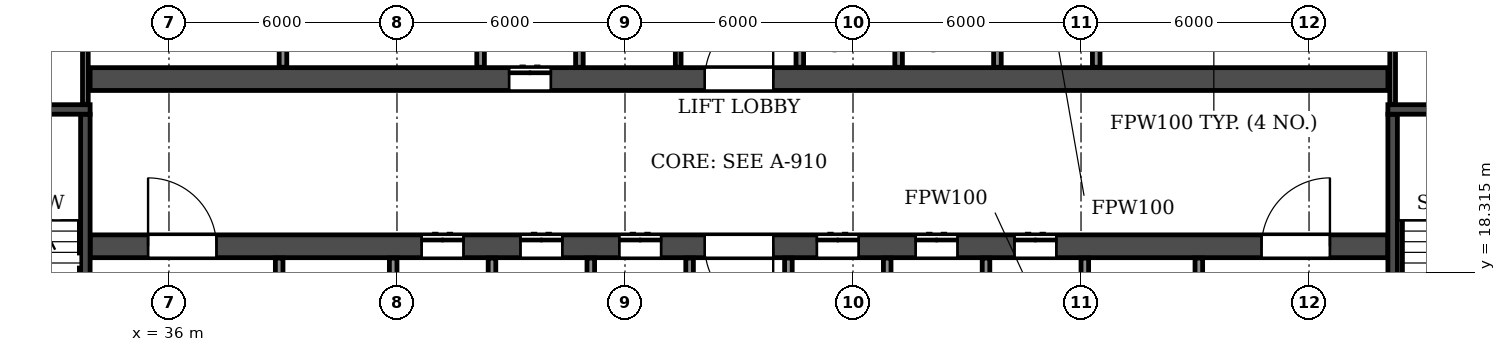
"""IFC4 building model, lengths in metres.
Left out: names, types, materials, properties, quantities, classifications, styles, units other than length and angle.
Written with IfcOpenShell. Run it as: python <this file> out.ifc"""

import sys

from ifc_helpers import new_model, si_unit, direction, frame, frame_2d, origin, place, context, subcontext, project, spatial, rectangle, extrude, element, fill, save


model = new_model("IFC4")
c1 = context("Model", 3, precision=1e-05, world=origin(), true_north=direction((0.0, 1.0)))
c2 = subcontext(c1, "Body", "Model", "MODEL_VIEW")
j1 = project(units=[si_unit("LENGTHUNIT", "METRE"), si_unit("PLANEANGLEUNIT", "RADIAN")], contexts=[c1])
p1 = place(None, origin())
s1 = spatial("IfcSite", under=j1, at=p1, CompositionType="ELEMENT")
p2 = place(p1, origin())
s2 = spatial("IfcBuilding", under=s1, at=p2, CompositionType="ELEMENT")
p3 = place(p2, frame((0.0, 0.0, 49.8)))
s3 = spatial("IfcBuildingStorey", under=s2, at=p3, CompositionType="ELEMENT", Elevation=49.8)
p4 = place(p3, frame((33.925, 19.0, 0.0), z_axis=(0.0, 0.0, 1.0), x_axis=(1.0, 0.0, 0.0)))
e1 = element("IfcWall", 1, at=p4, inside=s3, PredefinedType="SOLIDWALL", context=c2, shape_type="SweptSolid", body=[
    extrude(rectangle(XDim=34.15, YDim=0.6, at=frame_2d((17.075, 0.0))), origin(), (0.0, 0.0, 1.0), 3.0),
])
p5 = place(p4, frame((16.175, 0.0, 0.0)))
e2 = element("IfcOpeningElement", 2, at=p5, cuts=e1, PredefinedType="OPENING", context=c2, shape_type="SweptSolid", body=[
    extrude(rectangle(XDim=1.8, YDim=2.1, at=frame_2d((0.9, 1.05))), frame((0.0, 0.31, 0.0), z_axis=(0.0, -1.0, 0.0), x_axis=(1.0, 0.0, 0.0)), (0.0, 0.0, 1.0), 0.62),
])
p6 = place(p4, frame((1.525, 0.0, 0.0)))
e3 = element("IfcOpeningElement", 3, at=p6, cuts=e1, PredefinedType="OPENING", context=c2, shape_type="SweptSolid", body=[
    extrude(rectangle(XDim=1.8, YDim=2.1, at=frame_2d((0.9, 1.05))), frame((0.0, 0.31, 0.0), z_axis=(0.0, -1.0, 0.0), x_axis=(1.0, 0.0, 0.0)), (0.0, 0.0, 1.0), 0.62),
])
p7 = place(p4, frame((8.725, 0.0, 0.0)))
e4 = element("IfcOpeningElement", 4, at=p7, cuts=e1, PredefinedType="OPENING", context=c2, shape_type="SweptSolid", body=[
    extrude(rectangle(XDim=1.1, YDim=2.1, at=frame_2d((0.55, 1.05))), frame((0.0, 0.31, 0.0), z_axis=(0.0, -1.0, 0.0), x_axis=(1.0, 0.0, 0.0)), (0.0, 0.0, 1.0), 0.62),
])
p8 = place(p4, frame((11.325, 0.0, 0.0)))
e5 = element("IfcOpeningElement", 5, at=p8, cuts=e1, PredefinedType="OPENING", context=c2, shape_type="SweptSolid", body=[
    extrude(rectangle(XDim=1.1, YDim=2.1, at=frame_2d((0.55, 1.05))), frame((0.0, 0.31, 0.0), z_axis=(0.0, -1.0, 0.0), x_axis=(1.0, 0.0, 0.0)), (0.0, 0.0, 1.0), 0.62),
])
p9 = place(p4, frame((13.925, 0.0, 0.0)))
e6 = element("IfcOpeningElement", 6, at=p9, cuts=e1, PredefinedType="OPENING", context=c2, shape_type="SweptSolid", body=[
    extrude(rectangle(XDim=1.1, YDim=2.1, at=frame_2d((0.55, 1.05))), frame((0.0, 0.31, 0.0), z_axis=(0.0, -1.0, 0.0), x_axis=(1.0, 0.0, 0.0)), (0.0, 0.0, 1.0), 0.62),
])
p10 = place(p4, frame((19.125, 0.0, 0.0)))
e7 = element("IfcOpeningElement", 7, at=p10, cuts=e1, PredefinedType="OPENING", context=c2, shape_type="SweptSolid", body=[
    extrude(rectangle(XDim=1.1, YDim=2.1, at=frame_2d((0.55, 1.05))), frame((0.0, 0.31, 0.0), z_axis=(0.0, -1.0, 0.0), x_axis=(1.0, 0.0, 0.0)), (0.0, 0.0, 1.0), 0.62),
])
p11 = place(p4, frame((21.725, 0.0, 0.0)))
e8 = element("IfcOpeningElement", 8, at=p11, cuts=e1, PredefinedType="OPENING", context=c2, shape_type="SweptSolid", body=[
    extrude(rectangle(XDim=1.1, YDim=2.1, at=frame_2d((0.55, 1.05))), frame((0.0, 0.31, 0.0), z_axis=(0.0, -1.0, 0.0), x_axis=(1.0, 0.0, 0.0)), (0.0, 0.0, 1.0), 0.62),
])
p12 = place(p4, frame((24.325, 0.0, 0.0)))
e9 = element("IfcOpeningElement", 9, at=p12, cuts=e1, PredefinedType="OPENING", context=c2, shape_type="SweptSolid", body=[
    extrude(rectangle(XDim=1.1, YDim=2.1, at=frame_2d((0.55, 1.05))), frame((0.0, 0.31, 0.0), z_axis=(0.0, -1.0, 0.0), x_axis=(1.0, 0.0, 0.0)), (0.0, 0.0, 1.0), 0.62),
])
p13 = place(p4, frame((30.825, 0.0, 0.0)))
e10 = element("IfcOpeningElement", 10, at=p13, cuts=e1, PredefinedType="OPENING", context=c2, shape_type="SweptSolid", body=[
    extrude(rectangle(XDim=1.8, YDim=2.1, at=frame_2d((0.9, 1.05))), frame((0.0, 0.31, 0.0), z_axis=(0.0, -1.0, 0.0), x_axis=(1.0, 0.0, 0.0)), (0.0, 0.0, 1.0), 0.62),
])
p14 = place(p3, frame((33.925, 23.4, 0.0), z_axis=(0.0, 0.0, 1.0), x_axis=(1.0, 0.0, 0.0)))
e11 = element("IfcWall", 11, at=p14, inside=s3, PredefinedType="SOLIDWALL", context=c2, shape_type="SweptSolid", body=[
    extrude(rectangle(XDim=34.15, YDim=0.6, at=frame_2d((17.075, 0.0))), origin(), (0.0, 0.0, 1.0), 3.0),
])
p15 = place(p14, frame((16.175, 0.0, 0.0)))
e12 = element("IfcOpeningElement", 12, at=p15, cuts=e11, PredefinedType="OPENING", context=c2, shape_type="SweptSolid", body=[
    extrude(rectangle(XDim=1.8, YDim=2.1, at=frame_2d((0.9, 1.05))), frame((0.0, 0.31, 0.0), z_axis=(0.0, -1.0, 0.0), x_axis=(1.0, 0.0, 0.0)), (0.0, 0.0, 1.0), 0.62),
])
p16 = place(p14, frame((11.025, 0.0, 0.0)))
e13 = element("IfcOpeningElement", 13, at=p16, cuts=e11, PredefinedType="OPENING", context=c2, shape_type="SweptSolid", body=[
    extrude(rectangle(XDim=1.1, YDim=2.1, at=frame_2d((0.55, 1.05))), frame((0.0, 0.31, 0.0), z_axis=(0.0, -1.0, 0.0), x_axis=(1.0, 0.0, 0.0)), (0.0, 0.0, 1.0), 0.62),
])
p17 = place(p3, frame((33.8, 14.9, 0.0), z_axis=(0.0, 0.0, 1.0), x_axis=(0.0, 1.0, 0.0)))
e14 = element("IfcWall", 14, at=p17, inside=s3, PredefinedType="SOLIDWALL", context=c2, shape_type="SweptSolid", body=[
    extrude(rectangle(XDim=7.575, YDim=0.25, at=frame_2d((3.788, 0.0))), origin(), (0.0, 0.0, 1.0), 3.0),
])
p18 = place(p17, frame((0.4, 0.0, 0.0)))
e15 = element("IfcOpeningElement", 15, at=p18, cuts=e14, PredefinedType="OPENING", context=c2, shape_type="SweptSolid", body=[
    extrude(rectangle(XDim=1.0, YDim=2.1, at=frame_2d((0.5, 1.05))), frame((0.0, 0.135, 0.0), z_axis=(0.0, -1.0, 0.0), x_axis=(1.0, 0.0, 0.0)), (0.0, 0.0, 1.0), 0.27),
])
p19 = place(p3, frame((29.875, 22.6, 0.0), z_axis=(0.0, 0.0, 1.0), x_axis=(1.0, 0.0, 0.0)))
e16 = element("IfcWall", 16, at=p19, inside=s3, PredefinedType="SOLIDWALL", context=c2, shape_type="SweptSolid", body=[
    extrude(rectangle(XDim=4.05, YDim=0.25, at=frame_2d((2.025, 0.0))), origin(), (0.0, 0.0, 1.0), 3.0),
])
p20 = place(p3, frame((68.2, 14.9, 0.0), z_axis=(0.0, 0.0, 1.0), x_axis=(0.0, 1.0, 0.0)))
e17 = element("IfcWall", 17, at=p20, inside=s3, PredefinedType="SOLIDWALL", context=c2, shape_type="SweptSolid", body=[
    extrude(rectangle(XDim=7.575, YDim=0.25, at=frame_2d((3.788, 0.0))), origin(), (0.0, 0.0, 1.0), 3.0),
])
p21 = place(p20, frame((0.4, 0.0, 0.0)))
e18 = element("IfcOpeningElement", 18, at=p21, cuts=e17, PredefinedType="OPENING", context=c2, shape_type="SweptSolid", body=[
    extrude(rectangle(XDim=1.0, YDim=2.1, at=frame_2d((0.5, 1.05))), frame((0.0, 0.135, 0.0), z_axis=(0.0, -1.0, 0.0), x_axis=(1.0, 0.0, 0.0)), (0.0, 0.0, 1.0), 0.27),
])
p22 = place(p3, frame((68.075, 22.6, 0.0), z_axis=(0.0, 0.0, 1.0), x_axis=(1.0, 0.0, 0.0)))
e19 = element("IfcWall", 19, at=p22, inside=s3, PredefinedType="SOLIDWALL", context=c2, shape_type="SweptSolid", body=[
    extrude(rectangle(XDim=4.05, YDim=0.25, at=frame_2d((2.025, 0.0))), origin(), (0.0, 0.0, 1.0), 3.0),
])
p23 = place(p3, frame((49.4, 23.71, 0.0), z_axis=(0.0, 0.0, 1.0), x_axis=(0.0, 1.0, 0.0)))
e20 = element("IfcWall", 20, at=p23, inside=s3, PredefinedType="PARTITIONING", context=c2, shape_type="SweptSolid", body=[
    extrude(rectangle(XDim=3.78, YDim=0.15, at=frame_2d((1.89, 0.0))), origin(), (0.0, 0.0, 1.0), 3.0),
])
p24 = place(p3, frame((39.0, 23.71, 0.0), z_axis=(0.0, 0.0, 1.0), x_axis=(0.0, 1.0, 0.0)))
e21 = element("IfcWall", 21, at=p24, inside=s3, PredefinedType="PARTITIONING", context=c2, shape_type="SweptSolid", body=[
    extrude(rectangle(XDim=3.78, YDim=0.2, at=frame_2d((1.89, 0.0))), origin(), (0.0, 0.0, 1.0), 3.0),
])
for number, where, z_axis, x_axis in (
    (22, (33.8, 22.735, 0.0), (0.0, 0.0, 1.0), (0.0, 1.0, 0.0)),
    (23, (68.2, 22.735, 0.0), (0.0, 0.0, 1.0), (0.0, 1.0, 0.0)),
):
    element("IfcWall", number, at=place(p3, frame(where, z_axis=z_axis, x_axis=x_axis)), inside=s3, PredefinedType="PARTITIONING", context=c2, shape_type="SweptSolid", body=[
        extrude(rectangle(XDim=4.755, YDim=0.15, at=frame_2d((2.377, 0.0))), origin(), (0.0, 0.0, 1.0), 3.0),
    ])
p25 = place(p3, frame((38.9, 14.91, 0.0), z_axis=(0.0, 0.0, 1.0), x_axis=(0.0, 1.0, 0.0)))
e24 = element("IfcWall", 24, at=p25, inside=s3, PredefinedType="PARTITIONING", context=c2, shape_type="SweptSolid", body=[
    extrude(rectangle(XDim=3.78, YDim=0.2, at=frame_2d((1.89, 0.0))), origin(), (0.0, 0.0, 1.0), 3.0),
])
p26 = place(p25, frame((1.34, 0.0, 0.0)))
e25 = element("IfcOpeningElement", 25, at=p26, cuts=e24, PredefinedType="OPENING", context=c2, shape_type="SweptSolid", body=[
    extrude(rectangle(XDim=1.1, YDim=2.1, at=frame_2d((0.55, 1.05))), frame((0.0, 0.11, 0.0), z_axis=(0.0, -1.0, 0.0), x_axis=(1.0, 0.0, 0.0)), (0.0, 0.0, 1.0), 0.22),
])
for number, where, z_axis, x_axis in (
    (26, (41.9, 14.91, 0.0), (0.0, 0.0, 1.0), (0.0, 1.0, 0.0)),
    (27, (44.2, 23.71, 0.0), (0.0, 0.0, 1.0), (0.0, 1.0, 0.0)),
):
    element("IfcWall", number, at=place(p3, frame(where, z_axis=z_axis, x_axis=x_axis)), inside=s3, PredefinedType="PARTITIONING", context=c2, shape_type="SweptSolid", body=[
        extrude(rectangle(XDim=3.78, YDim=0.2, at=frame_2d((1.89, 0.0))), origin(), (0.0, 0.0, 1.0), 3.0),
    ])
p27 = place(p3, frame((44.5, 16.3, 0.0), z_axis=(0.0, 0.0, 1.0), x_axis=(0.0, 1.0, 0.0)))
e28 = element("IfcWall", 28, at=p27, inside=s3, PredefinedType="PARTITIONING", context=c2, shape_type="SweptSolid", body=[
    extrude(rectangle(XDim=2.39, YDim=0.2, at=frame_2d((1.195, 0.0))), origin(), (0.0, 0.0, 1.0), 3.0),
])
p28 = place(p3, frame((46.8, 23.71, 0.0), z_axis=(0.0, 0.0, 1.0), x_axis=(0.0, 1.0, 0.0)))
e29 = element("IfcWall", 29, at=p28, inside=s3, PredefinedType="PARTITIONING", context=c2, shape_type="SweptSolid", body=[
    extrude(rectangle(XDim=3.78, YDim=0.2, at=frame_2d((1.89, 0.0))), origin(), (0.0, 0.0, 1.0), 3.0),
])
for number, where, z_axis, x_axis in (
    (30, (47.1, 16.3, 0.0), (0.0, 0.0, 1.0), (0.0, 1.0, 0.0)),
    (31, (49.7, 16.3, 0.0), (0.0, 0.0, 1.0), (0.0, 1.0, 0.0)),
    (32, (52.3, 16.3, 0.0), (0.0, 0.0, 1.0), (0.0, 1.0, 0.0)),
):
    element("IfcWall", number, at=place(p3, frame(where, z_axis=z_axis, x_axis=x_axis)), inside=s3, PredefinedType="PARTITIONING", context=c2, shape_type="SweptSolid", body=[
        extrude(rectangle(XDim=2.39, YDim=0.2, at=frame_2d((1.195, 0.0))), origin(), (0.0, 0.0, 1.0), 3.0),
    ])
p29 = place(p3, frame((52.6, 23.71, 0.0), z_axis=(0.0, 0.0, 1.0), x_axis=(0.0, 1.0, 0.0)))
e33 = element("IfcWall", 33, at=p29, inside=s3, PredefinedType="PARTITIONING", context=c2, shape_type="SweptSolid", body=[
    extrude(rectangle(XDim=2.39, YDim=0.2, at=frame_2d((1.195, 0.0))), origin(), (0.0, 0.0, 1.0), 3.0),
])
p30 = place(p3, frame((54.9, 16.3, 0.0), z_axis=(0.0, 0.0, 1.0), x_axis=(0.0, 1.0, 0.0)))
e34 = element("IfcWall", 34, at=p30, inside=s3, PredefinedType="PARTITIONING", context=c2, shape_type="SweptSolid", body=[
    extrude(rectangle(XDim=2.39, YDim=0.2, at=frame_2d((1.195, 0.0))), origin(), (0.0, 0.0, 1.0), 3.0),
])
p31 = place(p3, frame((55.2, 23.71, 0.0), z_axis=(0.0, 0.0, 1.0), x_axis=(0.0, 1.0, 0.0)))
e35 = element("IfcWall", 35, at=p31, inside=s3, PredefinedType="PARTITIONING", context=c2, shape_type="SweptSolid", body=[
    extrude(rectangle(XDim=2.39, YDim=0.2, at=frame_2d((1.195, 0.0))), origin(), (0.0, 0.0, 1.0), 3.0),
])
p32 = place(p3, frame((57.5, 16.3, 0.0), z_axis=(0.0, 0.0, 1.0), x_axis=(0.0, 1.0, 0.0)))
e36 = element("IfcWall", 36, at=p32, inside=s3, PredefinedType="PARTITIONING", context=c2, shape_type="SweptSolid", body=[
    extrude(rectangle(XDim=2.39, YDim=0.2, at=frame_2d((1.195, 0.0))), origin(), (0.0, 0.0, 1.0), 3.0),
])
p33 = place(p3, frame((57.8, 23.71, 0.0), z_axis=(0.0, 0.0, 1.0), x_axis=(0.0, 1.0, 0.0)))
e37 = element("IfcWall", 37, at=p33, inside=s3, PredefinedType="PARTITIONING", context=c2, shape_type="SweptSolid", body=[
    extrude(rectangle(XDim=2.39, YDim=0.2, at=frame_2d((1.195, 0.0))), origin(), (0.0, 0.0, 1.0), 3.0),
])
p34 = place(p3, frame((60.1, 14.91, 0.0), z_axis=(0.0, 0.0, 1.0), x_axis=(0.0, 1.0, 0.0)))
e38 = element("IfcWall", 38, at=p34, inside=s3, PredefinedType="PARTITIONING", context=c2, shape_type="SweptSolid", body=[
    extrude(rectangle(XDim=3.78, YDim=0.2, at=frame_2d((1.89, 0.0))), origin(), (0.0, 0.0, 1.0), 3.0),
])
p35 = place(p3, frame((60.4, 23.71, 0.0), z_axis=(0.0, 0.0, 1.0), x_axis=(0.0, 1.0, 0.0)))
e39 = element("IfcWall", 39, at=p35, inside=s3, PredefinedType="PARTITIONING", context=c2, shape_type="SweptSolid", body=[
    extrude(rectangle(XDim=2.39, YDim=0.2, at=frame_2d((1.195, 0.0))), origin(), (0.0, 0.0, 1.0), 3.0),
])
p36 = place(p3, frame((63.1, 14.91, 0.0), z_axis=(0.0, 0.0, 1.0), x_axis=(0.0, 1.0, 0.0)))
e40 = element("IfcWall", 40, at=p36, inside=s3, PredefinedType="PARTITIONING", context=c2, shape_type="SweptSolid", body=[
    extrude(rectangle(XDim=3.78, YDim=0.2, at=frame_2d((1.89, 0.0))), origin(), (0.0, 0.0, 1.0), 3.0),
])
p37 = place(p36, frame((1.34, 0.0, 0.0)))
e41 = element("IfcOpeningElement", 41, at=p37, cuts=e40, PredefinedType="OPENING", context=c2, shape_type="SweptSolid", body=[
    extrude(rectangle(XDim=1.1, YDim=2.1, at=frame_2d((0.55, 1.05))), frame((0.0, 0.11, 0.0), z_axis=(0.0, -1.0, 0.0), x_axis=(1.0, 0.0, 0.0)), (0.0, 0.0, 1.0), 0.22),
])
p38 = place(p15, origin())
e42 = element("IfcDoor", 42, at=p38, inside=s3, OperationType="DOUBLE_DOOR_SINGLE_SWING", PredefinedType="DOOR", context=c2, shape_type="SweptSolid", body=[
    extrude(rectangle(XDim=1.8, YDim=2.1, at=frame_2d((0.9, 1.05))), frame((0.0, 0.025, 0.0), z_axis=(0.0, -1.0, 0.0), x_axis=(1.0, 0.0, 0.0)), (0.0, 0.0, 1.0), 0.05),
])
fill(e12, e42)
p39 = place(p5, frame((1.8, 0.0, 0.0), z_axis=(0.0, 0.0, 1.0), x_axis=(-1.0, 0.0, 0.0)))
e43 = element("IfcDoor", 43, at=p39, inside=s3, OperationType="DOUBLE_DOOR_SINGLE_SWING", PredefinedType="DOOR", context=c2, shape_type="SweptSolid", body=[
    extrude(rectangle(XDim=1.8, YDim=2.1, at=frame_2d((0.9, 1.05))), frame((0.0, 0.025, 0.0), z_axis=(0.0, -1.0, 0.0), x_axis=(1.0, 0.0, 0.0)), (0.0, 0.0, 1.0), 0.05),
])
fill(e2, e43)
p40 = place(p6, origin())
e44 = element("IfcDoor", 44, at=p40, inside=s3, OperationType="DOUBLE_DOOR_SINGLE_SWING", PredefinedType="DOOR", context=c2, shape_type="SweptSolid", body=[
    extrude(rectangle(XDim=1.8, YDim=2.1, at=frame_2d((0.9, 1.05))), frame((0.0, 0.025, 0.0), z_axis=(0.0, -1.0, 0.0), x_axis=(1.0, 0.0, 0.0)), (0.0, 0.0, 1.0), 0.05),
])
fill(e3, e44)
p41 = place(p7, origin())
e45 = element("IfcDoor", 45, at=p41, inside=s3, OperationType="DOUBLE_DOOR_SLIDING", PredefinedType="DOOR", context=c2, shape_type="SweptSolid", body=[
    extrude(rectangle(XDim=1.1, YDim=2.1, at=frame_2d((0.55, 1.05))), frame((0.0, 0.025, 0.0), z_axis=(0.0, -1.0, 0.0), x_axis=(1.0, 0.0, 0.0)), (0.0, 0.0, 1.0), 0.05),
])
fill(e4, e45)
p42 = place(p16, origin())
e46 = element("IfcDoor", 46, at=p42, inside=s3, OperationType="DOUBLE_DOOR_SLIDING", PredefinedType="DOOR", context=c2, shape_type="SweptSolid", body=[
    extrude(rectangle(XDim=1.1, YDim=2.1, at=frame_2d((0.55, 1.05))), frame((0.0, 0.025, 0.0), z_axis=(0.0, -1.0, 0.0), x_axis=(1.0, 0.0, 0.0)), (0.0, 0.0, 1.0), 0.05),
])
fill(e13, e46)
p43 = place(p8, origin())
e47 = element("IfcDoor", 47, at=p43, inside=s3, OperationType="DOUBLE_DOOR_SLIDING", PredefinedType="DOOR", context=c2, shape_type="SweptSolid", body=[
    extrude(rectangle(XDim=1.1, YDim=2.1, at=frame_2d((0.55, 1.05))), frame((0.0, 0.025, 0.0), z_axis=(0.0, -1.0, 0.0), x_axis=(1.0, 0.0, 0.0)), (0.0, 0.0, 1.0), 0.05),
])
fill(e5, e47)
p44 = place(p9, origin())
e48 = element("IfcDoor", 48, at=p44, inside=s3, OperationType="DOUBLE_DOOR_SLIDING", PredefinedType="DOOR", context=c2, shape_type="SweptSolid", body=[
    extrude(rectangle(XDim=1.1, YDim=2.1, at=frame_2d((0.55, 1.05))), frame((0.0, 0.025, 0.0), z_axis=(0.0, -1.0, 0.0), x_axis=(1.0, 0.0, 0.0)), (0.0, 0.0, 1.0), 0.05),
])
fill(e6, e48)
p45 = place(p10, origin())
e49 = element("IfcDoor", 49, at=p45, inside=s3, OperationType="DOUBLE_DOOR_SLIDING", PredefinedType="DOOR", context=c2, shape_type="SweptSolid", body=[
    extrude(rectangle(XDim=1.1, YDim=2.1, at=frame_2d((0.55, 1.05))), frame((0.0, 0.025, 0.0), z_axis=(0.0, -1.0, 0.0), x_axis=(1.0, 0.0, 0.0)), (0.0, 0.0, 1.0), 0.05),
])
fill(e7, e49)
p46 = place(p11, origin())
e50 = element("IfcDoor", 50, at=p46, inside=s3, OperationType="DOUBLE_DOOR_SLIDING", PredefinedType="DOOR", context=c2, shape_type="SweptSolid", body=[
    extrude(rectangle(XDim=1.1, YDim=2.1, at=frame_2d((0.55, 1.05))), frame((0.0, 0.025, 0.0), z_axis=(0.0, -1.0, 0.0), x_axis=(1.0, 0.0, 0.0)), (0.0, 0.0, 1.0), 0.05),
])
fill(e8, e50)
p47 = place(p12, origin())
e51 = element("IfcDoor", 51, at=p47, inside=s3, OperationType="DOUBLE_DOOR_SLIDING", PredefinedType="DOOR", context=c2, shape_type="SweptSolid", body=[
    extrude(rectangle(XDim=1.1, YDim=2.1, at=frame_2d((0.55, 1.05))), frame((0.0, 0.025, 0.0), z_axis=(0.0, -1.0, 0.0), x_axis=(1.0, 0.0, 0.0)), (0.0, 0.0, 1.0), 0.05),
])
fill(e9, e51)
p48 = place(p13, origin())
e52 = element("IfcDoor", 52, at=p48, inside=s3, OperationType="DOUBLE_DOOR_SINGLE_SWING", PredefinedType="DOOR", context=c2, shape_type="SweptSolid", body=[
    extrude(rectangle(XDim=1.8, YDim=2.1, at=frame_2d((0.9, 1.05))), frame((0.0, 0.025, 0.0), z_axis=(0.0, -1.0, 0.0), x_axis=(1.0, 0.0, 0.0)), (0.0, 0.0, 1.0), 0.05),
])
fill(e10, e52)
save(model, sys.argv[1])
